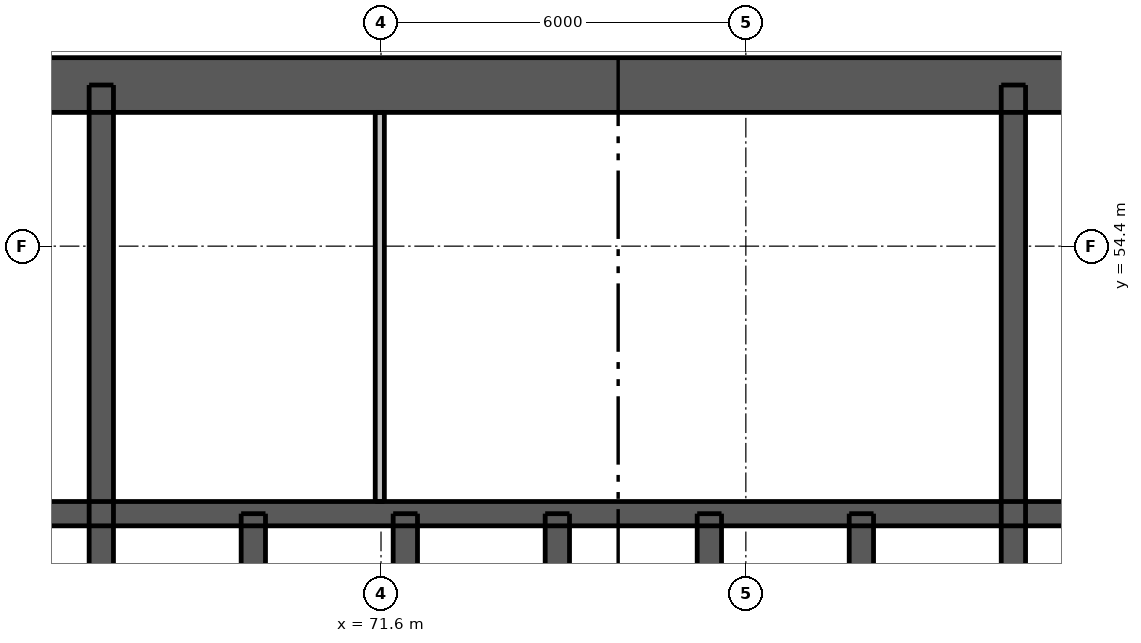
"""IFC4 building model, lengths in metres.
Left out: names, types, materials, properties, quantities, classifications, styles, units other than length and angle.
Written with IfcOpenShell. Run it as: python <this file> out.ifc"""

import sys

from ifc_helpers import new_model, si_unit, direction, frame, frame_2d, origin, place, context, subcontext, project, spatial, rectangle, extrude, element, fill, save


model = new_model("IFC4")
c1 = context("Model", 3, precision=1e-05, world=origin(), true_north=direction((0.0, 1.0)))
c2 = subcontext(c1, "Body", "Model", "MODEL_VIEW")
j1 = project(units=[si_unit("LENGTHUNIT", "METRE"), si_unit("PLANEANGLEUNIT", "RADIAN")], contexts=[c1])
p1 = place(None, origin())
s1 = spatial("IfcSite", under=j1, at=p1, CompositionType="ELEMENT")
p2 = place(p1, origin())
s2 = spatial("IfcBuilding", under=s1, at=p2, CompositionType="ELEMENT")
p3 = place(p2, frame((0.0, 0.0, 63.1)))
s3 = spatial("IfcBuildingStorey", under=s2, at=p3, CompositionType="ELEMENT", Elevation=63.1)
p4 = place(p3, frame((62.5, 57.05, 0.0), z_axis=(0.0, 0.0, 1.0), x_axis=(1.0, 0.0, 0.0)))
e1 = element("IfcWall", 1, at=p4, inside=s3, PredefinedType="SHEAR", context=c2, shape_type="SweptSolid", body=[
    extrude(rectangle(XDim=24.0, YDim=0.9, at=frame_2d((12.0, 0.0))), origin(), (0.0, 0.0, 1.0), 3.05),
])
p5 = place(p4, frame((20.85, 0.0, 0.0)))
e2 = element("IfcOpeningElement", 2, at=p5, cuts=e1, PredefinedType="OPENING", context=c2, shape_type="SweptSolid", body=[
    extrude(rectangle(XDim=1.1, YDim=2.1, at=frame_2d((0.55, 1.05))), frame((0.0, 0.46, 0.0), z_axis=(0.0, -1.0, 0.0), x_axis=(1.0, 0.0, 0.0)), (0.0, 0.0, 1.0), 0.92),
])
p6 = place(p4, frame((2.05, 0.0, 0.0)))
e3 = element("IfcOpeningElement", 3, at=p6, cuts=e1, PredefinedType="OPENING", context=c2, shape_type="SweptSolid", body=[
    extrude(rectangle(XDim=1.1, YDim=2.1, at=frame_2d((0.55, 1.05))), frame((0.0, 0.46, 0.0), z_axis=(0.0, -1.0, 0.0), x_axis=(1.0, 0.0, 0.0)), (0.0, 0.0, 1.0), 0.92),
])
p7 = place(p4, frame((6.44, 0.0, 0.0)))
e4 = element("IfcOpeningElement", 4, at=p7, cuts=e1, PredefinedType="OPENING", context=c2, shape_type="SweptSolid", body=[
    extrude(rectangle(XDim=0.9, YDim=2.1, at=frame_2d((0.45, 1.05))), frame((0.0, 0.46, 0.0), z_axis=(0.0, -1.0, 0.0), x_axis=(1.0, 0.0, 0.0)), (0.0, 0.0, 1.0), 0.92),
])
p8 = place(p4, frame((13.74, 0.0, 0.0)))
e5 = element("IfcOpeningElement", 5, at=p8, cuts=e1, PredefinedType="OPENING", context=c2, shape_type="SweptSolid", body=[
    extrude(rectangle(XDim=0.9, YDim=2.1, at=frame_2d((0.45, 1.05))), frame((0.0, 0.46, 0.0), z_axis=(0.0, -1.0, 0.0), x_axis=(1.0, 0.0, 0.0)), (0.0, 0.0, 1.0), 0.92),
])
p9 = place(p3, frame((62.95, 50.0, 0.0), z_axis=(0.0, 0.0, 1.0), x_axis=(1.0, 0.0, 0.0)))
e6 = element("IfcWall", 6, at=p9, inside=s3, PredefinedType="SHEAR", context=c2, shape_type="SweptSolid", body=[
    extrude(rectangle(XDim=23.1, YDim=0.4, at=frame_2d((11.55, 0.0))), origin(), (0.0, 0.0, 1.0), 3.05),
])
for number, where, z_axis, x_axis in (
    (7, (67.0, 47.1, 0.0), (0.0, 0.0, 1.0), (0.0, 1.0, 0.0)),
    (8, (82.0, 47.1, 0.0), (0.0, 0.0, 1.0), (0.0, 1.0, 0.0)),
):
    element("IfcWall", number, at=place(p3, frame(where, z_axis=z_axis, x_axis=x_axis)), inside=s3, PredefinedType="SHEAR", context=c2, shape_type="SweptSolid", body=[
        extrude(rectangle(XDim=9.95, YDim=0.4, at=frame_2d((4.975, 0.0))), origin(), (0.0, 0.0, 1.0), 3.05),
    ])
for number, where, z_axis, x_axis in (
    (9, (69.5, 47.1, 0.0), (0.0, 0.0, 1.0), (0.0, 1.0, 0.0)),
    (10, (72.0, 47.1, 0.0), (0.0, 0.0, 1.0), (0.0, 1.0, 0.0)),
    (11, (74.5, 47.1, 0.0), (0.0, 0.0, 1.0), (0.0, 1.0, 0.0)),
    (12, (77.0, 47.1, 0.0), (0.0, 0.0, 1.0), (0.0, 1.0, 0.0)),
    (13, (79.5, 47.1, 0.0), (0.0, 0.0, 1.0), (0.0, 1.0, 0.0)),
):
    element("IfcWall", number, at=place(p3, frame(where, z_axis=z_axis, x_axis=x_axis)), inside=s3, PredefinedType="SHEAR", context=c2, shape_type="SweptSolid", body=[
        extrude(rectangle(XDim=2.9, YDim=0.4, at=frame_2d((1.45, 0.0))), origin(), (0.0, 0.0, 1.0), 3.05),
    ])
p10 = place(p3, frame((71.58, 50.2, 0.0), z_axis=(0.0, 0.0, 1.0), x_axis=(0.0, 1.0, 0.0)))
e14 = element("IfcWall", 14, at=p10, inside=s3, PredefinedType="PLUMBINGWALL", context=c2, shape_type="SweptSolid", body=[
    extrude(rectangle(XDim=6.4, YDim=0.15, at=frame_2d((3.2, 0.0))), origin(), (0.0, 0.0, 1.0), 3.05),
])
p11 = place(p7, origin())
e15 = element("IfcDoor", 15, at=p11, inside=s3, OperationType="SINGLE_SWING_RIGHT", PredefinedType="DOOR", context=c2, shape_type="SweptSolid", body=[
    extrude(rectangle(XDim=0.9, YDim=2.1, at=frame_2d((0.45, 1.05))), frame((0.0, -0.388, 0.0), z_axis=(0.0, -1.0, 0.0), x_axis=(1.0, 0.0, 0.0)), (0.0, 0.0, 1.0), 0.05),
])
fill(e4, e15)
p12 = place(p8, origin())
e16 = element("IfcDoor", 16, at=p12, inside=s3, OperationType="SINGLE_SWING_RIGHT", PredefinedType="DOOR", context=c2, shape_type="SweptSolid", body=[
    extrude(rectangle(XDim=0.9, YDim=2.1, at=frame_2d((0.45, 1.05))), frame((0.0, -0.388, 0.0), z_axis=(0.0, -1.0, 0.0), x_axis=(1.0, 0.0, 0.0)), (0.0, 0.0, 1.0), 0.05),
])
fill(e5, e16)
save(model, sys.argv[1])
